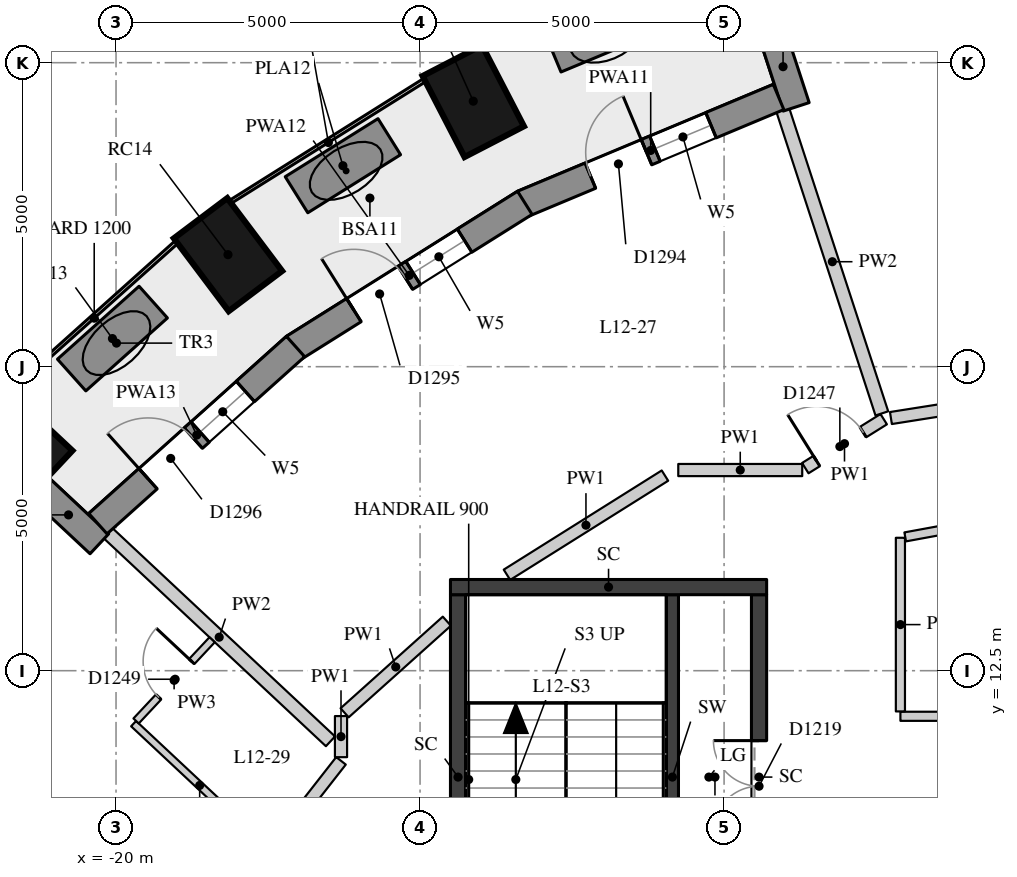
"""IFC4 building model, lengths in metres.
Left out: names, types, materials, properties, quantities, classifications, styles, units other than length and angle.
Written with IfcOpenShell. Run it as: python <this file> out.ifc"""

import sys

from ifc_helpers import new_model, si_unit, direction, frame, frame_2d, origin, origin_2d, place, context, subcontext, project, spatial, rectangle, extrude, element, fill, save


model = new_model("IFC4")
c1 = context("Model", 3, precision=1e-05, world=origin(), true_north=direction((0.0, 1.0)))
c2 = subcontext(c1, "Body", "Model", "MODEL_VIEW")
j1 = project(units=[si_unit("LENGTHUNIT", "METRE"), si_unit("PLANEANGLEUNIT", "RADIAN")], contexts=[c1])
p1 = place(None, origin())
s1 = spatial("IfcSite", under=j1, at=p1, CompositionType="ELEMENT")
p2 = place(p1, origin())
s2 = spatial("IfcBuilding", under=s1, at=p2, CompositionType="ELEMENT")
p3 = place(p2, frame((0.0, 0.0, 48.1)))
s3 = spatial("IfcBuildingStorey", under=s2, at=p3, CompositionType="ELEMENT", Elevation=48.1)
for number, where, z_axis, x_axis in (
    (1, (-14.125, 21.867, 0.0), (0.0, 0.0, 1.0), (-0.46, 0.888, 0.0)),
    (2, (-18.159, 19.343, 0.0), (0.0, 0.0, 1.0), (-0.601, 0.799, 0.0)),
    (3, (-21.641, 16.23, 0.0), (0.0, 0.0, 1.0), (-0.73, 0.683, 0.0)),
):
    element("IfcColumn", number, at=place(p3, frame(where, z_axis=z_axis, x_axis=x_axis)), inside=s3, PredefinedType="COLUMN", context=c2, shape_type="SweptSolid", body=[
        extrude(rectangle(XDim=1.5, YDim=1.1, at=origin_2d()), origin(), (0.0, 0.0, 1.0), 3.3),
    ])
p4 = place(p3, frame((-9.246, 23.095, 0.0), z_axis=(0.0, 0.0, 1.0), x_axis=(0.310110311429, -0.950700581017, 0.0)))
e4 = element("IfcWall", 4, at=p4, inside=s3, PredefinedType="SOLIDWALL", context=c2, shape_type="SweptSolid", body=[
    extrude(rectangle(XDim=1.39, YDim=0.45, at=frame_2d((0.695, 0.0))), origin(), (0.0, 0.0, 1.0), 3.02),
])
p5 = place(p3, frame((-21.289, 15.538, 0.0), z_axis=(0.0, 0.0, 1.0), x_axis=(0.730149942784, -0.683286953668, 0.0)))
e5 = element("IfcWall", 5, at=p5, inside=s3, PredefinedType="SOLIDWALL", context=c2, shape_type="SweptSolid", body=[
    extrude(rectangle(XDim=1.391, YDim=0.45, at=frame_2d((0.695, 0.0))), origin(), (0.0, 0.0, 1.0), 3.02),
])
p6 = place(p3, frame((-9.104, 21.936, 0.0), z_axis=(0.0, 0.0, 1.0), x_axis=(-0.922645368502, -0.385649483317, 0.0)))
e6 = element("IfcWall", 6, at=p6, inside=s3, PredefinedType="SOLIDWALL", context=c2, shape_type="SweptSolid", body=[
    extrude(rectangle(XDim=4.559, YDim=0.45, at=frame_2d((2.279, 0.0))), origin(), (0.0, 0.0, 1.0), 3.02),
])
p7 = place(p6, frame((1.204, 0.0, 0.4)))
e7 = element("IfcOpeningElement", 7, at=p7, cuts=e6, PredefinedType="OPENING", context=c2, shape_type="SweptSolid", body=[
    extrude(rectangle(XDim=1.0, YDim=1.75, at=frame_2d((0.5, 0.875))), frame((0.0, 0.235, 0.0), z_axis=(0.0, -1.0, 0.0), x_axis=(1.0, 0.0, 0.0)), (0.0, 0.0, 1.0), 0.47),
])
p8 = place(p6, frame((2.354, 0.0, 0.0)))
e8 = element("IfcOpeningElement", 8, at=p8, cuts=e6, PredefinedType="OPENING", context=c2, shape_type="SweptSolid", body=[
    extrude(rectangle(XDim=1.0, YDim=2.15, at=frame_2d((0.5, 1.075))), frame((0.0, 0.235, 0.0), z_axis=(0.0, -1.0, 0.0), x_axis=(1.0, 0.0, 0.0)), (0.0, 0.0, 1.0), 0.47),
])
p9 = place(p3, frame((-13.277, 20.195, 0.0), z_axis=(0.0, 0.0, 1.0), x_axis=(-0.846976005863, -0.531631117874, 0.0)))
e9 = element("IfcWall", 9, at=p9, inside=s3, PredefinedType="SOLIDWALL", context=c2, shape_type="SweptSolid", body=[
    extrude(rectangle(XDim=4.488, YDim=0.45, at=frame_2d((2.244, 0.0))), origin(), (0.0, 0.0, 1.0), 3.02),
])
p10 = place(p9, frame((1.169, 0.0, 0.4)))
e10 = element("IfcOpeningElement", 10, at=p10, cuts=e9, PredefinedType="OPENING", context=c2, shape_type="SweptSolid", body=[
    extrude(rectangle(XDim=1.0, YDim=1.75, at=frame_2d((0.5, 0.875))), frame((0.0, 0.235, 0.0), z_axis=(0.0, -1.0, 0.0), x_axis=(1.0, 0.0, 0.0)), (0.0, 0.0, 1.0), 0.47),
])
p11 = place(p9, frame((2.319, 0.0, 0.0)))
e11 = element("IfcOpeningElement", 11, at=p11, cuts=e9, PredefinedType="OPENING", context=c2, shape_type="SweptSolid", body=[
    extrude(rectangle(XDim=1.0, YDim=2.15, at=frame_2d((0.5, 1.075))), frame((0.0, 0.235, 0.0), z_axis=(0.0, -1.0, 0.0), x_axis=(1.0, 0.0, 0.0)), (0.0, 0.0, 1.0), 0.47),
])
p12 = place(p3, frame((-17.048, 17.832, 0.0), z_axis=(0.0, 0.0, 1.0), x_axis=(-0.744619286768, -0.667489413978, 0.0)))
e12 = element("IfcWall", 12, at=p12, inside=s3, PredefinedType="SOLIDWALL", context=c2, shape_type="SweptSolid", body=[
    extrude(rectangle(XDim=4.365, YDim=0.45, at=frame_2d((2.183, 0.0))), origin(), (0.0, 0.0, 1.0), 3.02),
])
p13 = place(p12, frame((1.107, 0.0, 0.4)))
e13 = element("IfcOpeningElement", 13, at=p13, cuts=e12, PredefinedType="OPENING", context=c2, shape_type="SweptSolid", body=[
    extrude(rectangle(XDim=1.0, YDim=1.75, at=frame_2d((0.5, 0.875))), frame((0.0, 0.235, 0.0), z_axis=(0.0, -1.0, 0.0), x_axis=(1.0, 0.0, 0.0)), (0.0, 0.0, 1.0), 0.47),
])
p14 = place(p12, frame((2.258, 0.0, 0.0)))
e14 = element("IfcOpeningElement", 14, at=p14, cuts=e12, PredefinedType="OPENING", context=c2, shape_type="SweptSolid", body=[
    extrude(rectangle(XDim=1.0, YDim=2.15, at=frame_2d((0.5, 1.075))), frame((0.0, 0.235, 0.0), z_axis=(0.0, -1.0, 0.0), x_axis=(1.0, 0.0, 0.0)), (0.0, 0.0, 1.0), 0.47),
])
p15 = place(p3, frame((-11.155, 23.362, 0.0), z_axis=(0.0, 0.0, 1.0), x_axis=(-0.923000660042, -0.384798364811, 0.0)))
e15 = element("IfcWall", 15, at=p15, inside=s3, PredefinedType="USERDEFINED", context=c2, shape_type="SweptSolid", body=[
    extrude(rectangle(XDim=1.8, YDim=0.7, at=frame_2d((0.9, 0.0))), origin(), (0.0, 0.0, 1.0), 0.75),
])
p16 = place(p3, frame((-15.506, 21.283, 0.0), z_axis=(0.0, 0.0, 1.0), x_axis=(-0.847609446823, -0.530620604252, 0.0)))
e16 = element("IfcWall", 16, at=p16, inside=s3, PredefinedType="USERDEFINED", context=c2, shape_type="SweptSolid", body=[
    extrude(rectangle(XDim=1.8, YDim=0.7, at=frame_2d((0.9, 0.0))), origin(), (0.0, 0.0, 1.0), 0.75),
])
p17 = place(p3, frame((-19.388, 18.562, 0.0), z_axis=(0.0, 0.0, 1.0), x_axis=(-0.745535653445, -0.666465745139, 0.0)))
e17 = element("IfcWall", 17, at=p17, inside=s3, PredefinedType="USERDEFINED", context=c2, shape_type="SweptSolid", body=[
    extrude(rectangle(XDim=1.8, YDim=0.7, at=frame_2d((0.9, 0.0))), origin(), (0.0, 0.0, 1.0), 0.75),
])
p18 = place(p3, frame((-10.85, 7.75, 0.0), z_axis=(0.0, 0.0, 1.0), x_axis=(0.0, 1.0, 0.0)))
e18 = element("IfcWall", 18, at=p18, inside=s3, PredefinedType="SHEAR", context=c2, shape_type="SweptSolid", body=[
    extrude(rectangle(XDim=6.0, YDim=0.2, at=frame_2d((3.0, 0.0))), origin(), (0.0, 0.0, 1.0), 3.02),
])
p19 = place(p18, frame((0.1, 0.0, 0.0)))
e19 = element("IfcOpeningElement", 19, at=p19, cuts=e18, PredefinedType="OPENING", context=c2, shape_type="SweptSolid", body=[
    extrude(rectangle(XDim=1.5, YDim=2.1, at=frame_2d((0.75, 1.05))), frame((0.0, 0.11, 0.0), z_axis=(0.0, -1.0, 0.0), x_axis=(1.0, 0.0, 0.0)), (0.0, 0.0, 1.0), 0.22),
])
p20 = place(p3, frame((-14.375, 7.75, -0.28), z_axis=(0.0, 0.0, 1.0), x_axis=(0.0, 1.0, 0.0)))
e20 = element("IfcWall", 20, at=p20, inside=s3, PredefinedType="SHEAR", context=c2, shape_type="SweptSolid", body=[
    extrude(rectangle(XDim=6.0, YDim=0.25, at=frame_2d((3.0, 0.0))), origin(), (0.0, 0.0, 1.0), 3.3),
])
p21 = place(p3, frame((-9.425, 7.75, -0.28), z_axis=(0.0, 0.0, 1.0), x_axis=(0.0, 1.0, 0.0)))
e21 = element("IfcWall", 21, at=p21, inside=s3, PredefinedType="SHEAR", context=c2, shape_type="SweptSolid", body=[
    extrude(rectangle(XDim=6.0, YDim=0.25, at=frame_2d((3.0, 0.0))), origin(), (0.0, 0.0, 1.0), 3.3),
])
p22 = place(p21, frame((2.1, 0.0, 0.28)))
e22 = element("IfcOpeningElement", 22, at=p22, cuts=e21, PredefinedType="OPENING", context=c2, shape_type="SweptSolid", body=[
    extrude(rectangle(XDim=1.5, YDim=2.1, at=frame_2d((0.75, 1.05))), frame((0.0, 0.135, 0.0), z_axis=(0.0, -1.0, 0.0), x_axis=(1.0, 0.0, 0.0)), (0.0, 0.0, 1.0), 0.27),
])
p23 = place(p3, frame((-14.5, 13.875, -0.28), z_axis=(0.0, 0.0, 1.0), x_axis=(1.0, 0.0, 0.0)))
e23 = element("IfcWall", 23, at=p23, inside=s3, PredefinedType="SHEAR", context=c2, shape_type="SweptSolid", body=[
    extrude(rectangle(XDim=5.2, YDim=0.25, at=frame_2d((2.6, 0.0))), origin(), (0.0, 0.0, 1.0), 3.3),
])
p24 = place(p3, frame((-18.196, 8.592, 0.0), z_axis=(0.0, 0.0, 1.0), x_axis=(0.615854849191, 0.787859635168, 0.0)))
e24 = element("IfcWall", 24, at=p24, inside=s3, PredefinedType="PARTITIONING", context=c2, shape_type="SweptSolid", body=[
    extrude(rectangle(XDim=3.079, YDim=0.2, at=frame_2d((1.539, 0.0))), origin(), (0.0, 0.0, 1.0), 3.02),
])
p25 = place(p3, frame((-16.3, 11.078, 0.0), z_axis=(0.0, 0.0, 1.0), x_axis=(0.0, 1.0, 0.0)))
e25 = element("IfcWall", 25, at=p25, inside=s3, PredefinedType="PARTITIONING", context=c2, shape_type="SweptSolid", body=[
    extrude(rectangle(XDim=0.676, YDim=0.2, at=frame_2d((0.338, 0.0))), origin(), (0.0, 0.0, 1.0), 3.02),
])
p26 = place(p3, frame((-16.24, 11.807, 0.0), z_axis=(0.0, 0.0, 1.0), x_axis=(0.744658399013, 0.667445779655, 0.0)))
e26 = element("IfcWall", 26, at=p26, inside=s3, PredefinedType="PARTITIONING", context=c2, shape_type="SweptSolid", body=[
    extrude(rectangle(XDim=2.258, YDim=0.2, at=frame_2d((1.129, 0.0))), origin(), (0.0, 0.0, 1.0), 3.02),
])
p27 = place(p3, frame((-13.571, 14.077, 0.0), z_axis=(0.0, 0.0, 1.0), x_axis=(0.846954991261, 0.53166459613, 0.0)))
e27 = element("IfcWall", 27, at=p27, inside=s3, PredefinedType="PARTITIONING", context=c2, shape_type="SweptSolid", body=[
    extrude(rectangle(XDim=3.068, YDim=0.2, at=frame_2d((1.534, 0.0))), origin(), (0.0, 0.0, 1.0), 3.02),
])
p28 = place(p3, frame((-10.753, 15.8, 0.0), z_axis=(0.0, 0.0, 1.0), x_axis=(1.0, 0.0, 0.0)))
e28 = element("IfcWall", 28, at=p28, inside=s3, PredefinedType="PARTITIONING", context=c2, shape_type="SweptSolid", body=[
    extrude(rectangle(XDim=2.039, YDim=0.2, at=frame_2d((1.019, 0.0))), origin(), (0.0, 0.0, 1.0), 3.02),
])
p29 = place(p3, frame((-8.664, 15.832, 0.0), z_axis=(0.0, 0.0, 1.0), x_axis=(0.848304931689, 0.529508019648, 0.0)))
e29 = element("IfcWall", 29, at=p29, inside=s3, PredefinedType="PARTITIONING", context=c2, shape_type="SweptSolid", body=[
    extrude(rectangle(XDim=1.52, YDim=0.2, at=frame_2d((0.76, 0.0))), origin(), (0.0, 0.0, 1.0), 3.02),
])
p30 = place(p29, frame((0.22, 0.0, 0.0)))
e30 = element("IfcOpeningElement", 30, at=p30, cuts=e29, PredefinedType="OPENING", context=c2, shape_type="SweptSolid", body=[
    extrude(rectangle(XDim=0.9, YDim=2.1, at=frame_2d((0.45, 1.05))), frame((0.0, 0.11, 0.0), z_axis=(0.0, -1.0, 0.0), x_axis=(1.0, 0.0, 0.0)), (0.0, 0.0, 1.0), 0.22),
])
p31 = place(p3, frame((-7.256, 16.656, 0.0), z_axis=(0.0, 0.0, 1.0), x_axis=(0.987787475409, 0.15580726371, 0.0)))
e31 = element("IfcWall", 31, at=p31, inside=s3, PredefinedType="PARTITIONING", context=c2, shape_type="SweptSolid", body=[
    extrude(rectangle(XDim=7.346, YDim=0.2, at=frame_2d((3.673, 0.0))), origin(), (0.0, 0.0, 1.0), 3.02),
])
p32 = place(p31, frame((3.86, 0.0, 0.0)))
e32 = element("IfcOpeningElement", 32, at=p32, cuts=e31, PredefinedType="OPENING", context=c2, shape_type="SweptSolid", body=[
    extrude(rectangle(XDim=1.1, YDim=2.1, at=frame_2d((0.55, 1.05))), frame((0.0, 0.11, 0.0), z_axis=(0.0, -1.0, 0.0), x_axis=(1.0, 0.0, 0.0)), (0.0, 0.0, 1.0), 0.22),
])
p33 = place(p3, frame((-4.58, 11.75, 0.0), z_axis=(0.0, 0.0, 1.0), x_axis=(-1.0, 0.0, 0.0)))
e33 = element("IfcWall", 33, at=p33, inside=s3, PredefinedType="PARTITIONING", context=c2, shape_type="SweptSolid", body=[
    extrude(rectangle(XDim=2.52, YDim=0.15, at=frame_2d((1.26, 0.0))), origin(), (0.0, 0.0, 1.0), 3.02),
])
p34 = place(p3, frame((-7.1, 11.83, 0.0), z_axis=(0.0, 0.0, 1.0), x_axis=(0.0, 1.0, 0.0)))
e34 = element("IfcWall", 34, at=p34, inside=s3, PredefinedType="PARTITIONING", context=c2, shape_type="SweptSolid", body=[
    extrude(rectangle(XDim=2.856, YDim=0.15, at=frame_2d((1.428, 0.0))), origin(), (0.0, 0.0, 1.0), 3.02),
])
p35 = place(p3, frame((-7.021, 14.701, 0.0), z_axis=(0.0, 0.0, 1.0), x_axis=(0.983567630435, 0.180540068573, 0.0)))
e35 = element("IfcWall", 35, at=p35, inside=s3, PredefinedType="PARTITIONING", context=c2, shape_type="SweptSolid", body=[
    extrude(rectangle(XDim=6.66, YDim=0.15, at=frame_2d((3.33, 0.0))), origin(), (0.0, 0.0, 1.0), 2.57),
])
p36 = place(p3, frame((-9.034, 21.721, 0.0), z_axis=(0.0, 0.0, 1.0), x_axis=(0.310304845104, -0.950637103791, 0.0)))
e36 = element("IfcWall", 36, at=p36, inside=s3, PredefinedType="PARTITIONING", context=c2, shape_type="SweptSolid", body=[
    extrude(rectangle(XDim=5.249, YDim=0.22, at=frame_2d((2.624, 0.0))), origin(), (0.0, 0.0, 1.0), 3.02),
])
p37 = place(p3, frame((-20.133, 14.764, 0.0), z_axis=(0.0, 0.0, 1.0), x_axis=(0.73007309337, -0.683369064516, 0.0)))
e37 = element("IfcWall", 37, at=p37, inside=s3, PredefinedType="PARTITIONING", context=c2, shape_type="SweptSolid", body=[
    extrude(rectangle(XDim=5.013, YDim=0.22, at=frame_2d((2.507, 0.0))), origin(), (0.0, 0.0, 1.0), 3.02),
])
p38 = place(p3, frame((-17.538, 9.596, 0.0), z_axis=(0.0, 0.0, 1.0), x_axis=(-0.730099766179, 0.683340567671, 0.0)))
e38 = element("IfcWall", 38, at=p38, inside=s3, PredefinedType="PARTITIONING", context=c2, shape_type="SweptSolid", body=[
    extrude(rectangle(XDim=2.976, YDim=0.12, at=frame_2d((1.488, 0.0))), origin(), (0.0, 0.0, 1.0), 3.02),
])
p39 = place(p3, frame((-19.67, 11.673, 0.0), z_axis=(0.0, 0.0, 1.0), x_axis=(0.683372850006, 0.730069550026, 0.0)))
e39 = element("IfcWall", 39, at=p39, inside=s3, PredefinedType="PARTITIONING", context=c2, shape_type="SweptSolid", body=[
    extrude(rectangle(XDim=1.83, YDim=0.12, at=frame_2d((0.915, 0.0))), origin(), (0.0, 0.0, 1.0), 3.02),
])
p40 = place(p39, frame((0.54, 0.0, 0.0)))
e40 = element("IfcOpeningElement", 40, at=p40, cuts=e39, PredefinedType="OPENING", context=c2, shape_type="SweptSolid", body=[
    extrude(rectangle(XDim=0.8, YDim=2.1, at=frame_2d((0.4, 1.05))), frame((0.0, 0.07, 0.0), z_axis=(0.0, -1.0, 0.0), x_axis=(1.0, 0.0, 0.0)), (0.0, 0.0, 1.0), 0.14),
])
p41 = place(p7, origin())
e41 = element("IfcWindow", 41, at=p41, inside=s3, PartitioningType="SINGLE_PANEL", PredefinedType="WINDOW", context=c2, shape_type="SweptSolid", body=[
    extrude(rectangle(XDim=1.0, YDim=1.75, at=frame_2d((0.5, 0.875))), frame((0.0, 0.035, 0.0), z_axis=(0.0, -1.0, 0.0), x_axis=(1.0, 0.0, 0.0)), (0.0, 0.0, 1.0), 0.06),
])
fill(e7, e41)
p42 = place(p8, frame((1.0, 0.0, 0.0), z_axis=(0.0, 0.0, 1.0), x_axis=(-1.0, 0.0, 0.0)))
e42 = element("IfcDoor", 42, at=p42, inside=s3, OperationType="SINGLE_SWING_RIGHT", PredefinedType="DOOR", context=c2, shape_type="SweptSolid", body=[
    extrude(rectangle(XDim=1.0, YDim=2.15, at=frame_2d((0.5, 1.075))), frame((0.0, 0.075, 0.0), z_axis=(0.0, -1.0, 0.0), x_axis=(1.0, 0.0, 0.0)), (0.0, 0.0, 1.0), 0.05),
])
fill(e8, e42)
p43 = place(p10, origin())
e43 = element("IfcWindow", 43, at=p43, inside=s3, PartitioningType="SINGLE_PANEL", PredefinedType="WINDOW", context=c2, shape_type="SweptSolid", body=[
    extrude(rectangle(XDim=1.0, YDim=1.75, at=frame_2d((0.5, 0.875))), frame((0.0, 0.035, 0.0), z_axis=(0.0, -1.0, 0.0), x_axis=(1.0, 0.0, 0.0)), (0.0, 0.0, 1.0), 0.06),
])
fill(e10, e43)
p44 = place(p11, frame((1.0, 0.0, 0.0), z_axis=(0.0, 0.0, 1.0), x_axis=(-1.0, 0.0, 0.0)))
e44 = element("IfcDoor", 44, at=p44, inside=s3, OperationType="SINGLE_SWING_LEFT", PredefinedType="DOOR", context=c2, shape_type="SweptSolid", body=[
    extrude(rectangle(XDim=1.0, YDim=2.15, at=frame_2d((0.5, 1.075))), frame((0.0, 0.075, 0.0), z_axis=(0.0, -1.0, 0.0), x_axis=(1.0, 0.0, 0.0)), (0.0, 0.0, 1.0), 0.05),
])
fill(e11, e44)
p45 = place(p13, origin())
e45 = element("IfcWindow", 45, at=p45, inside=s3, PartitioningType="SINGLE_PANEL", PredefinedType="WINDOW", context=c2, shape_type="SweptSolid", body=[
    extrude(rectangle(XDim=1.0, YDim=1.75, at=frame_2d((0.5, 0.875))), frame((0.0, 0.035, 0.0), z_axis=(0.0, -1.0, 0.0), x_axis=(1.0, 0.0, 0.0)), (0.0, 0.0, 1.0), 0.06),
])
fill(e13, e45)
p46 = place(p14, frame((1.0, 0.0, 0.0), z_axis=(0.0, 0.0, 1.0), x_axis=(-1.0, 0.0, 0.0)))
e46 = element("IfcDoor", 46, at=p46, inside=s3, OperationType="SINGLE_SWING_LEFT", PredefinedType="DOOR", context=c2, shape_type="SweptSolid", body=[
    extrude(rectangle(XDim=1.0, YDim=2.15, at=frame_2d((0.5, 1.075))), frame((0.0, 0.075, 0.0), z_axis=(0.0, -1.0, 0.0), x_axis=(1.0, 0.0, 0.0)), (0.0, 0.0, 1.0), 0.05),
])
fill(e14, e46)
p47 = place(p22, origin())
e47 = element("IfcDoor", 47, at=p47, inside=s3, OperationType="DOUBLE_DOOR_SINGLE_SWING", PredefinedType="DOOR", context=c2, shape_type="SweptSolid", body=[
    extrude(rectangle(XDim=1.5, YDim=2.1, at=frame_2d((0.75, 1.05))), frame((0.0, 0.025, 0.0), z_axis=(0.0, -1.0, 0.0), x_axis=(1.0, 0.0, 0.0)), (0.0, 0.0, 1.0), 0.05),
])
fill(e22, e47)
p48 = place(p30, origin())
e48 = element("IfcDoor", 48, at=p48, inside=s3, OperationType="SINGLE_SWING_LEFT", PredefinedType="DOOR", context=c2, shape_type="SweptSolid", body=[
    extrude(rectangle(XDim=0.9, YDim=2.1, at=frame_2d((0.45, 1.05))), frame((0.0, 0.025, 0.0), z_axis=(0.0, -1.0, 0.0), x_axis=(1.0, 0.0, 0.0)), (0.0, 0.0, 1.0), 0.05),
])
fill(e30, e48)
p49 = place(p40, origin())
e49 = element("IfcDoor", 49, at=p49, inside=s3, OperationType="SINGLE_SWING_RIGHT", PredefinedType="DOOR", context=c2, shape_type="SweptSolid", body=[
    extrude(rectangle(XDim=0.8, YDim=2.1, at=frame_2d((0.4, 1.05))), frame((0.0, 0.025, 0.0), z_axis=(0.0, -1.0, 0.0), x_axis=(1.0, 0.0, 0.0)), (0.0, 0.0, 1.0), 0.05),
])
fill(e40, e49)
save(model, sys.argv[1])
